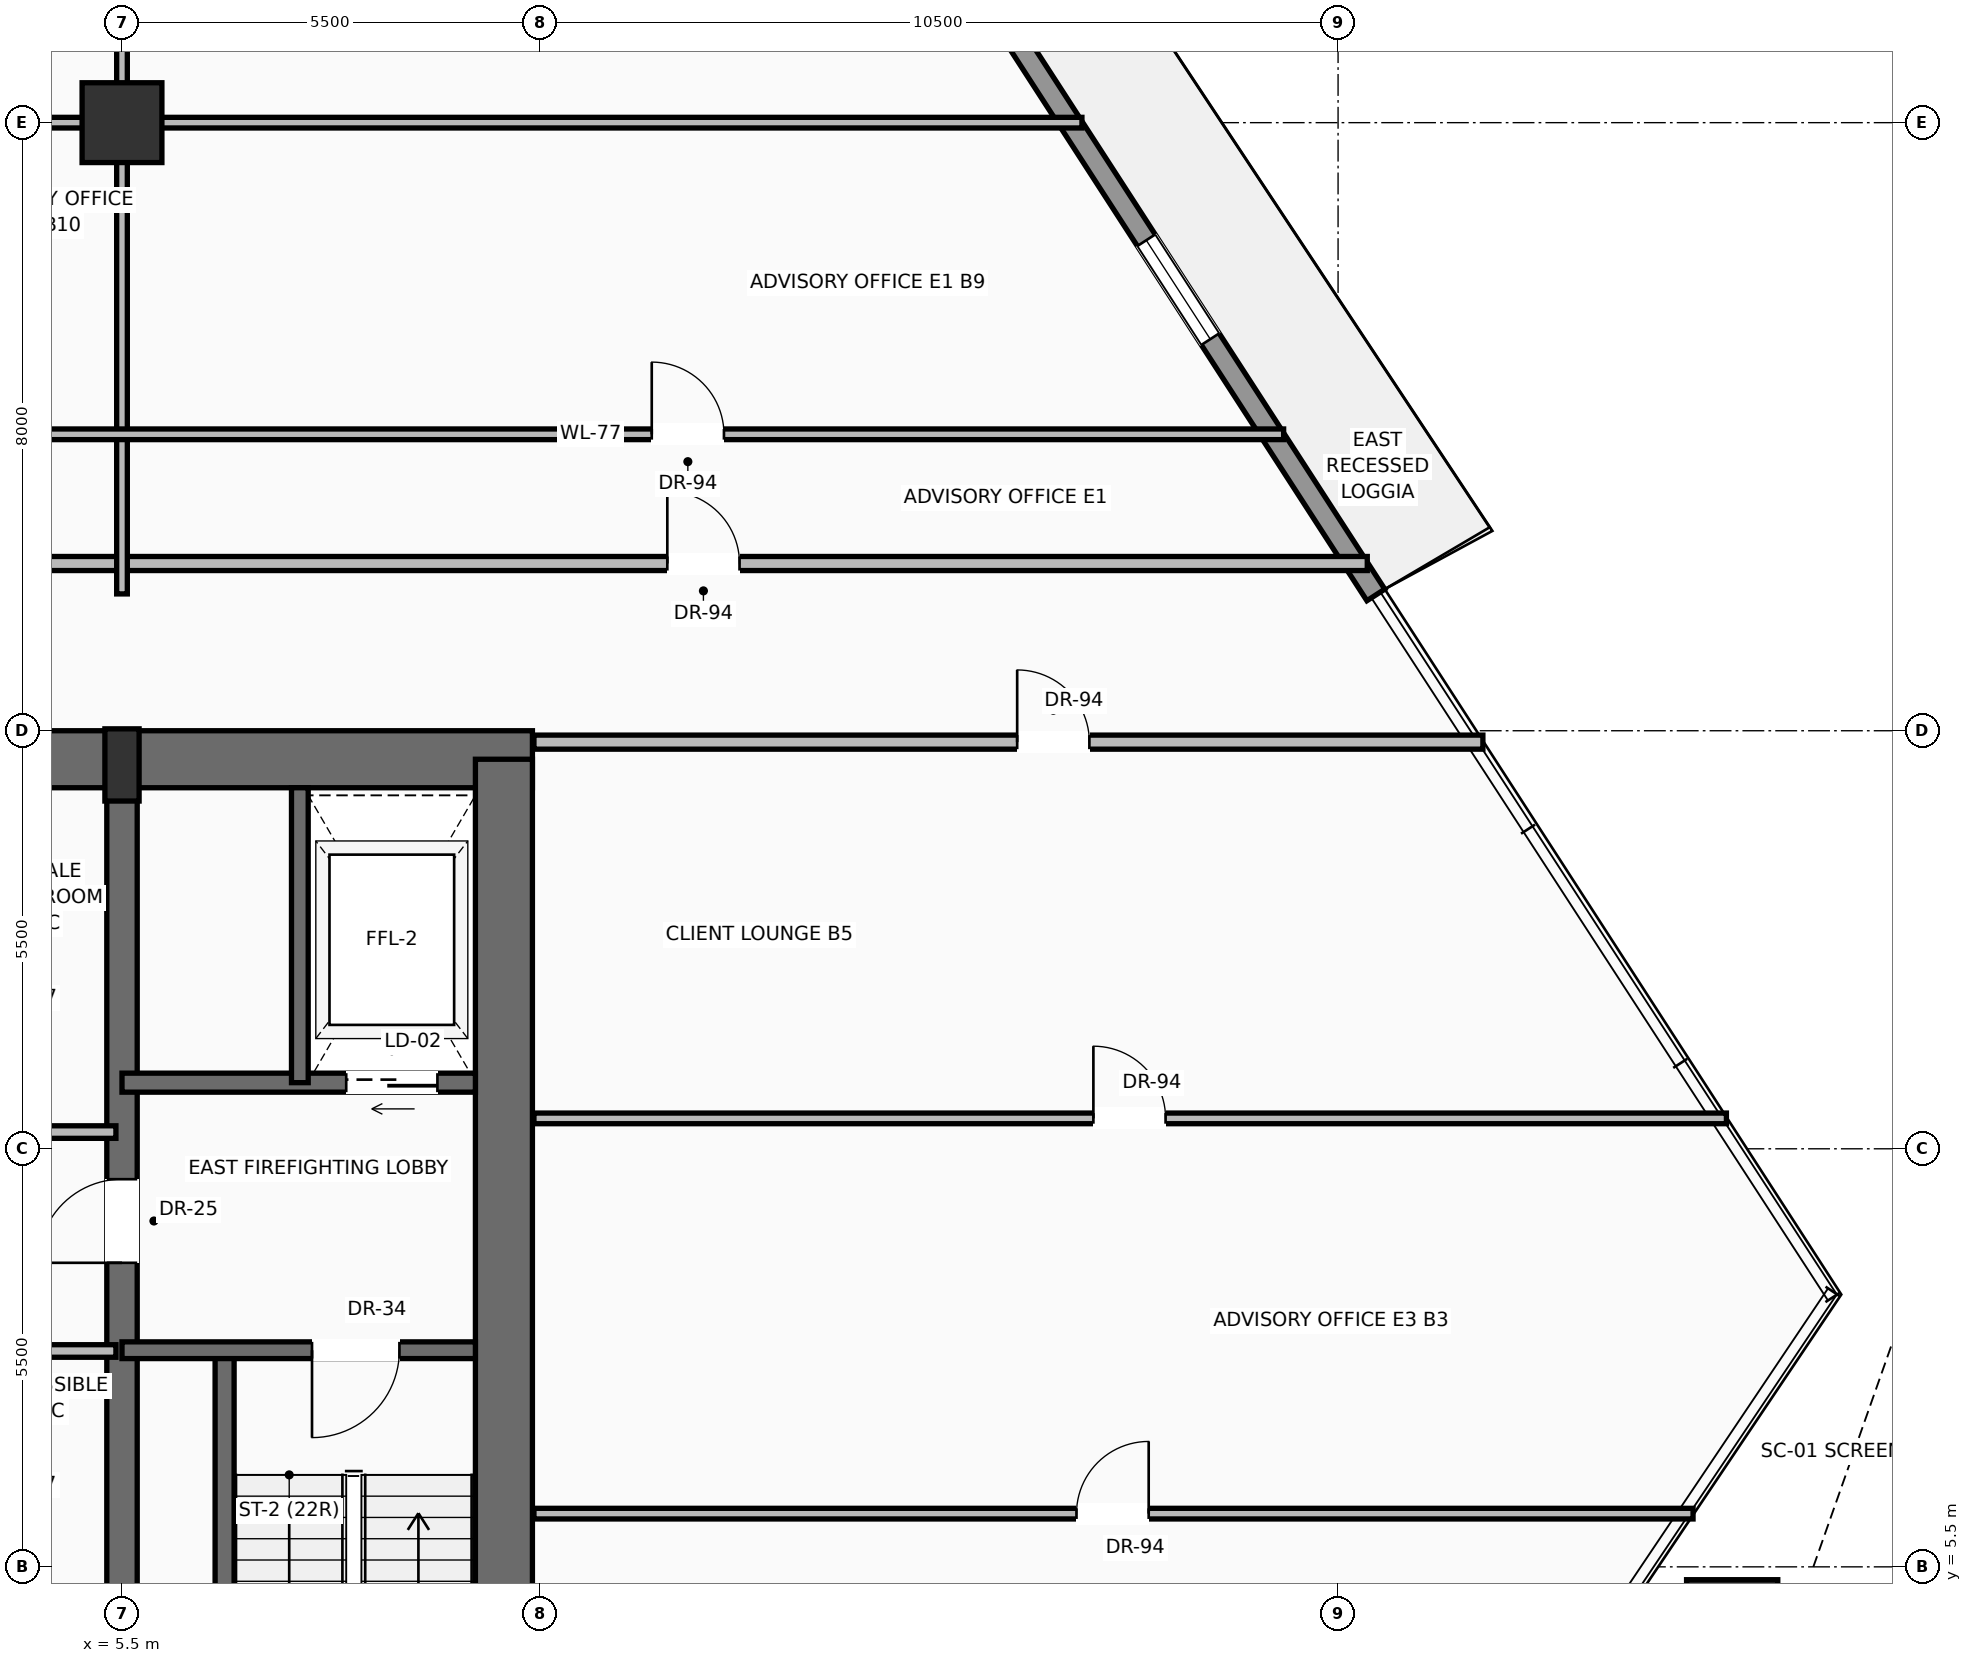
"""IFC4 building model, lengths in metres.
Left out: names, types, materials, properties, quantities, classifications, styles, units other than length and angle.
Written with IfcOpenShell. Run it as: python <this file> out.ifc"""

import sys

from ifc_helpers import new_model, si_unit, direction, frame, frame_2d, origin, origin_2d, place, context, subcontext, project, spatial, rectangle, hollow_rectangle, extrude, source, transform, mapped, element, fill, save


model = new_model("IFC4")
c1 = context("Model", 3, precision=1e-05, world=origin(), true_north=direction((0.0, 1.0)))
c2 = subcontext(c1, "Body", "Model", "MODEL_VIEW")
j1 = project(units=[si_unit("LENGTHUNIT", "METRE"), si_unit("PLANEANGLEUNIT", "RADIAN")], contexts=[c1])
p1 = place(None, origin())
s1 = spatial("IfcSite", under=j1, at=p1, CompositionType="ELEMENT")
p2 = place(p1, origin())
s2 = spatial("IfcBuilding", under=s1, at=p2, CompositionType="ELEMENT")
p3 = place(p2, frame((0.0, 0.0, 95.1)))
s3 = spatial("IfcBuildingStorey", under=s2, at=p3, CompositionType="ELEMENT", Elevation=95.1)
p4 = place(p3, frame((-10.9, 16.125, 0.0), z_axis=(0.0, 0.0, 1.0), x_axis=(1.0, 0.0, 0.0)))
e1 = element("IfcWall", 1, at=p4, inside=s3, PredefinedType="SHEAR", context=c2, shape_type="SweptSolid", body=[
    extrude(rectangle(XDim=21.8, YDim=0.75, at=frame_2d((10.9, 0.0))), origin(), (0.0, 0.0, 1.0), 3.45),
])
p5 = place(p4, frame((3.47, 0.0, 0.0)))
e2 = element("IfcOpeningElement", 2, at=p5, cuts=e1, PredefinedType="OPENING", context=c2, shape_type="SweptSolid", body=[
    extrude(rectangle(XDim=1.3, YDim=2.3, at=frame_2d((0.65, 1.15))), frame((0.0, 0.385, 0.0), z_axis=(0.0, -1.0, 0.0), x_axis=(1.0, 0.0, 0.0)), (0.0, 0.0, 1.0), 0.77),
])
p6 = place(p4, frame((9.9, 0.0, 0.0)))
e3 = element("IfcOpeningElement", 3, at=p6, cuts=e1, PredefinedType="OPENING", context=c2, shape_type="SweptSolid", body=[
    extrude(rectangle(XDim=2.0, YDim=2.4, at=frame_2d((1.0, 1.2))), frame((0.0, 0.385, 0.0), z_axis=(0.0, -1.0, 0.0), x_axis=(1.0, 0.0, 0.0)), (0.0, 0.0, 1.0), 0.77),
])
p7 = place(p3, frame((10.525, 0.475, 0.0), z_axis=(0.0, 0.0, 1.0), x_axis=(0.0, 1.0, 0.0)))
e4 = element("IfcWall", 4, at=p7, inside=s3, PredefinedType="SHEAR", context=c2, shape_type="SweptSolid", body=[
    extrude(rectangle(XDim=15.65, YDim=0.75, at=frame_2d((7.825, 0.0))), origin(), (0.0, 0.0, 1.0), 3.45),
])
p8 = place(p3, frame((5.5, 0.475, 0.0), z_axis=(0.0, 0.0, 1.0), x_axis=(0.0, 1.0, 0.0)))
e5 = element("IfcWall", 5, at=p8, inside=s3, PredefinedType="SHEAR", context=c2, shape_type="SweptSolid", body=[
    extrude(rectangle(XDim=15.65, YDim=0.4, at=frame_2d((7.825, 0.0))), origin(), (0.0, 0.0, 1.0), 3.45),
])
p9 = place(p8, frame((9.025, 0.0, 0.0)))
e6 = element("IfcOpeningElement", 6, at=p9, cuts=e5, PredefinedType="OPENING", context=c2, shape_type="SweptSolid", body=[
    extrude(rectangle(XDim=1.1, YDim=2.2, at=frame_2d((0.55, 1.1))), frame((0.0, 0.21, 0.0), z_axis=(0.0, -1.0, 0.0), x_axis=(1.0, 0.0, 0.0)), (0.0, 0.0, 1.0), 0.42),
])
m1 = source(origin(), c2, "Body", "SweptSolid", [
    extrude(rectangle(XDim=0.45, YDim=0.95, at=origin_2d()), origin(), (0.0, 0.0, 1.0), 3.7),
])
p10 = place(p3, frame((5.5, 16.05, 0.0), z_axis=(0.0, 0.0, 1.0), x_axis=(1.0, 0.0, 0.0)))
e7 = element("IfcColumn", 7, at=p10, inside=s3, PredefinedType="PILASTER", context=c2, shape_type="MappedRepresentation", body=[
    mapped(m1, transform((0.0, 0.0, 0.0), scale=1.0)),
])
m2 = source(origin(), c2, "Body", "SweptSolid", [
    extrude(hollow_rectangle(XDim=1.2, YDim=1.2, WallThickness=0.06, at=origin_2d()), origin(), (0.0, 0.0, 1.0), 3.692),
])
p11 = place(p3, frame((26.685, 4.731, 0.004), z_axis=(-0.000396800785, -0.016004298321, 0.99987184428), x_axis=(0.999692785574, -0.024785771543, 0.0)))
e8 = element("IfcColumn", 8, at=p11, inside=s3, PredefinedType="COLUMN", context=c2, shape_type="MappedRepresentation", body=[
    mapped(m2, transform((0.0, 0.0, 0.0), scale=1.0)),
])
m3 = source(origin(), c2, "Body", "SweptSolid", [
    extrude(rectangle(XDim=1.05, YDim=1.05, at=origin_2d()), origin(), (0.0, 0.0, 1.0), 3.7),
])
p12 = place(p3, frame((5.5, 24.5, 0.0), z_axis=(0.0, 0.0, 1.0), x_axis=(1.0, 0.0, 0.0)))
e9 = element("IfcColumn", 9, at=p12, inside=s3, PredefinedType="COLUMN", context=c2, shape_type="MappedRepresentation", body=[
    mapped(m3, transform((0.0, 0.0, 0.0), scale=1.0)),
])
p13 = place(p3, frame((12.558, 32.869, 0.0), z_axis=(0.0, 0.0, 1.0), x_axis=(0.543391713386, -0.839479270634, 0.0)))
e10 = element("IfcWall", 10, at=p13, inside=s3, PredefinedType="SOLIDWALL", context=c2, shape_type="SweptSolid", body=[
    extrude(rectangle(XDim=17.371, YDim=0.28, at=frame_2d((8.686, 0.0))), origin(), (0.0, 0.0, 1.0), 3.03),
])
p14 = place(p13, frame((4.169, 0.0, 0.0)))
e11 = element("IfcOpeningElement", 11, at=p14, cuts=e10, PredefinedType="OPENING", context=c2, shape_type="SweptSolid", body=[
    extrude(rectangle(XDim=1.6, YDim=2.35, at=frame_2d((0.8, 1.175))), frame((0.0, 0.15, 0.0), z_axis=(0.0, -1.0, 0.0), x_axis=(1.0, 0.0, 0.0)), (0.0, 0.0, 1.0), 0.3),
])
p15 = place(p13, frame((11.812, 0.0, 0.9)))
e12 = element("IfcOpeningElement", 12, at=p15, cuts=e10, PredefinedType="OPENING", context=c2, shape_type="SweptSolid", body=[
    extrude(rectangle(XDim=1.55, YDim=1.85, at=frame_2d((0.775, 0.925))), frame((0.0, 0.15, 0.0), z_axis=(0.0, -1.0, 0.0), x_axis=(1.0, 0.0, 0.0)), (0.0, 0.0, 1.0), 0.3),
])
p16 = place(p3, frame((6.85, 0.85, 0.0), z_axis=(0.0, 0.0, 1.0), x_axis=(0.0, 1.0, 0.0)))
e13 = element("IfcWall", 13, at=p16, inside=s3, PredefinedType="SOLIDWALL", context=c2, shape_type="SweptSolid", body=[
    extrude(rectangle(XDim=7.5, YDim=0.25, at=frame_2d((3.75, 0.0))), origin(), (0.0, 0.0, 1.0), 3.45),
])
p17 = place(p3, frame((10.15, 8.35, 0.0), z_axis=(0.0, 0.0, 1.0), x_axis=(-1.0, 0.0, 0.0)))
e14 = element("IfcWall", 14, at=p17, inside=s3, PredefinedType="SOLIDWALL", context=c2, shape_type="SweptSolid", body=[
    extrude(rectangle(XDim=4.65, YDim=0.22, at=frame_2d((2.325, 0.0))), origin(), (0.0, 0.0, 1.0), 3.45),
])
p18 = place(p17, frame((1.0, 0.0, 0.0)))
e15 = element("IfcOpeningElement", 15, at=p18, cuts=e14, PredefinedType="OPENING", context=c2, shape_type="SweptSolid", body=[
    extrude(rectangle(XDim=1.15, YDim=2.2, at=frame_2d((0.575, 1.1))), frame((0.0, 0.12, 0.0), z_axis=(0.0, -1.0, 0.0), x_axis=(1.0, 0.0, 0.0)), (0.0, 0.0, 1.0), 0.24),
])
p19 = place(p3, frame((10.15, 11.87, 0.0), z_axis=(0.0, 0.0, 1.0), x_axis=(-1.0, 0.0, 0.0)))
e16 = element("IfcWall", 16, at=p19, inside=s3, PredefinedType="SOLIDWALL", context=c2, shape_type="SweptSolid", body=[
    extrude(rectangle(XDim=4.65, YDim=0.25, at=frame_2d((2.325, 0.0))), origin(), (0.0, 0.0, 1.0), 3.45),
])
p20 = place(p19, frame((0.5, 0.0, 0.0)))
e17 = element("IfcOpeningElement", 17, at=p20, cuts=e16, PredefinedType="OPENING", context=c2, shape_type="SweptSolid", body=[
    extrude(rectangle(XDim=1.2, YDim=2.25, at=frame_2d((0.6, 1.125))), frame((0.0, 0.135, 0.0), z_axis=(0.0, -1.0, 0.0), x_axis=(1.0, 0.0, 0.0)), (0.0, 0.0, 1.0), 0.27),
])
p21 = place(p3, frame((7.84, 11.87, 0.0), z_axis=(0.0, 0.0, 1.0), x_axis=(0.0, 1.0, 0.0)))
e18 = element("IfcWall", 18, at=p21, inside=s3, PredefinedType="SOLIDWALL", context=c2, shape_type="SweptSolid", body=[
    extrude(rectangle(XDim=3.88, YDim=0.22, at=frame_2d((1.94, 0.0))), origin(), (0.0, 0.0, 1.0), 3.45),
])
for number, where, z_axis, x_axis in (
    (19, (3.54, 8.34, 0.0), (0.0, 0.0, 1.0), (1.0, 0.0, 0.0)),
    (20, (3.54, 11.22, 0.0), (0.0, 0.0, 1.0), (1.0, 0.0, 0.0)),
):
    element("IfcWall", number, at=place(p3, frame(where, z_axis=z_axis, x_axis=x_axis)), inside=s3, PredefinedType="PARTITIONING", context=c2, shape_type="SweptSolid", body=[
        extrude(rectangle(XDim=1.88, YDim=0.165, at=frame_2d((0.94, 0.0))), origin(), (0.0, 0.0, 1.0), 3.442),
    ])
p22 = place(p3, frame((10.92, 16.35, 0.0), z_axis=(0.0, 0.0, 1.0), x_axis=(1.0, 0.0, 0.0)))
e21 = element("IfcWall", 21, at=p22, inside=s3, PredefinedType="PARTITIONING", context=c2, shape_type="SweptSolid", body=[
    extrude(rectangle(XDim=12.485, YDim=0.185, at=frame_2d((6.243, 0.0))), origin(), (0.0, 0.0, 1.0), 2.747),
])
p23 = place(p22, frame((6.358, 0.0, 0.0)))
e22 = element("IfcOpeningElement", 22, at=p23, cuts=e21, PredefinedType="OPENING", context=c2, shape_type="SweptSolid", body=[
    extrude(rectangle(XDim=0.95, YDim=2.2, at=frame_2d((0.475, 1.1))), frame((0.0, 0.103, 0.0), z_axis=(0.0, -1.0, 0.0), x_axis=(1.0, 0.0, 0.0)), (0.0, 0.0, 1.0), 0.205),
])
p24 = place(p3, frame((2.55, 18.7, 0.0), z_axis=(0.0, 0.0, 1.0), x_axis=(1.0, 0.0, 0.0)))
e23 = element("IfcWall", 23, at=p24, inside=s3, PredefinedType="PARTITIONING", context=c2, shape_type="SweptSolid", body=[
    extrude(rectangle(XDim=19.334, YDim=0.185, at=frame_2d((9.667, 0.0))), origin(), (0.0, 0.0, 1.0), 2.747),
])
p25 = place(p24, frame((10.125, 0.0, 0.0)))
e24 = element("IfcOpeningElement", 24, at=p25, cuts=e23, PredefinedType="OPENING", context=c2, shape_type="SweptSolid", body=[
    extrude(rectangle(XDim=0.95, YDim=2.2, at=frame_2d((0.475, 1.1))), frame((0.0, 0.103, 0.0), z_axis=(0.0, -1.0, 0.0), x_axis=(1.0, 0.0, 0.0)), (0.0, 0.0, 1.0), 0.205),
])
p26 = place(p3, frame((5.5, 18.3, 0.0), z_axis=(0.0, 0.0, 1.0), x_axis=(0.0, 1.0, 0.0)))
e25 = element("IfcWall", 25, at=p26, inside=s3, PredefinedType="PARTITIONING", context=c2, shape_type="SweptSolid", body=[
    extrude(rectangle(XDim=13.2, YDim=0.14, at=frame_2d((6.6, 0.0))), origin(), (0.0, 0.0, 1.0), 2.747),
])
p27 = place(p26, frame((10.671, 0.0, 0.0)))
e26 = element("IfcOpeningElement", 26, at=p27, cuts=e25, PredefinedType="OPENING", context=c2, shape_type="SweptSolid", body=[
    extrude(rectangle(XDim=0.95, YDim=2.2, at=frame_2d((0.475, 1.1))), frame((0.0, 0.08, 0.0), z_axis=(0.0, -1.0, 0.0), x_axis=(1.0, 0.0, 0.0)), (0.0, 0.0, 1.0), 0.16),
])
p28 = place(p26, frame((7.767, 0.0, 0.0)))
e27 = element("IfcOpeningElement", 27, at=p28, cuts=e25, PredefinedType="OPENING", context=c2, shape_type="SweptSolid", body=[
    extrude(rectangle(XDim=0.95, YDim=2.2, at=frame_2d((0.475, 1.1))), frame((0.0, 0.08, 0.0), z_axis=(0.0, -1.0, 0.0), x_axis=(1.0, 0.0, 0.0)), (0.0, 0.0, 1.0), 0.16),
])
p29 = place(p3, frame((2.55, 20.4, 0.0), z_axis=(0.0, 0.0, 1.0), x_axis=(1.0, 0.0, 0.0)))
e28 = element("IfcWall", 28, at=p29, inside=s3, PredefinedType="PARTITIONING", context=c2, shape_type="SweptSolid", body=[
    extrude(rectangle(XDim=18.234, YDim=0.14, at=frame_2d((9.117, 0.0))), origin(), (0.0, 0.0, 1.0), 2.747),
])
p30 = place(p29, frame((9.92, 0.0, 0.0)))
e29 = element("IfcOpeningElement", 29, at=p30, cuts=e28, PredefinedType="OPENING", context=c2, shape_type="SweptSolid", body=[
    extrude(rectangle(XDim=0.95, YDim=2.2, at=frame_2d((0.475, 1.1))), frame((0.0, 0.08, 0.0), z_axis=(0.0, -1.0, 0.0), x_axis=(1.0, 0.0, 0.0)), (0.0, 0.0, 1.0), 0.16),
])
p31 = place(p3, frame((2.55, 24.5, 0.0), z_axis=(0.0, 0.0, 1.0), x_axis=(1.0, 0.0, 0.0)))
e30 = element("IfcWall", 30, at=p31, inside=s3, PredefinedType="PARTITIONING", context=c2, shape_type="SweptSolid", body=[
    extrude(rectangle(XDim=15.58, YDim=0.14, at=frame_2d((7.79, 0.0))), origin(), (0.0, 0.0, 1.0), 2.747),
])
p32 = place(p3, frame((10.92, 6.2, 0.0), z_axis=(0.0, 0.0, 1.0), x_axis=(1.0, 0.0, 0.0)))
e31 = element("IfcWall", 31, at=p32, inside=s3, PredefinedType="PARTITIONING", context=c2, shape_type="SweptSolid", body=[
    extrude(rectangle(XDim=15.25, YDim=0.14, at=frame_2d((7.625, 0.0))), origin(), (0.0, 0.0, 1.0), 2.979),
])
p33 = place(p32, frame((7.138, 0.0, 0.0)))
e32 = element("IfcOpeningElement", 32, at=p33, cuts=e31, PredefinedType="OPENING", context=c2, shape_type="SweptSolid", body=[
    extrude(rectangle(XDim=0.95, YDim=2.2, at=frame_2d((0.475, 1.1))), frame((0.0, 0.08, 0.0), z_axis=(0.0, -1.0, 0.0), x_axis=(1.0, 0.0, 0.0)), (0.0, 0.0, 1.0), 0.16),
])
p34 = place(p3, frame((10.92, 11.4, 0.0), z_axis=(0.0, 0.0, 1.0), x_axis=(1.0, 0.0, 0.0)))
e33 = element("IfcWall", 33, at=p34, inside=s3, PredefinedType="PARTITIONING", context=c2, shape_type="SweptSolid", body=[
    extrude(rectangle(XDim=15.689, YDim=0.14, at=frame_2d((7.845, 0.0))), origin(), (0.0, 0.0, 1.0), 3.442),
])
p35 = place(p34, frame((7.361, 0.0, 0.0)))
e34 = element("IfcOpeningElement", 34, at=p35, cuts=e33, PredefinedType="OPENING", context=c2, shape_type="SweptSolid", body=[
    extrude(rectangle(XDim=0.95, YDim=2.2, at=frame_2d((0.475, 1.1))), frame((0.0, 0.08, 0.0), z_axis=(0.0, -1.0, 0.0), x_axis=(1.0, 0.0, 0.0)), (0.0, 0.0, 1.0), 0.16),
])
m4 = source(origin(), c2, "Body", "SweptSolid", [
    extrude(rectangle(XDim=1.55, YDim=1.85, at=frame_2d((0.775, 0.925))), frame((0.0, 0.03, 0.0), z_axis=(0.0, -1.0, 0.0), x_axis=(1.0, 0.0, 0.0)), (0.0, 0.0, 1.0), 0.06),
])
p36 = place(p15, origin())
e35 = element("IfcWindow", 35, at=p36, inside=s3, PartitioningType="SINGLE_PANEL", PredefinedType="WINDOW", context=c2, shape_type="MappedRepresentation", body=[
    mapped(m4, transform((0.0, 0.0, 0.0), scale=1.0)),
])
fill(e12, e35)
m5 = source(origin(), c2, "Body", "SweptSolid", [
    extrude(rectangle(XDim=1.15, YDim=2.2, at=frame_2d((0.575, 1.1))), frame((0.0, 0.025, 0.0), z_axis=(0.0, -1.0, 0.0), x_axis=(1.0, 0.0, 0.0)), (0.0, 0.0, 1.0), 0.05),
])
p37 = place(p18, origin())
e36 = element("IfcDoor", 36, at=p37, inside=s3, OperationType="SINGLE_SWING_RIGHT", PredefinedType="DOOR", context=c2, shape_type="MappedRepresentation", body=[
    mapped(m5, transform((0.0, 0.0, 0.0), scale=1.0)),
])
fill(e15, e36)
m6 = source(origin(), c2, "Body", "SweptSolid", [
    extrude(rectangle(XDim=1.1, YDim=2.2, at=frame_2d((0.55, 1.1))), frame((0.0, 0.025, 0.0), z_axis=(0.0, -1.0, 0.0), x_axis=(1.0, 0.0, 0.0)), (0.0, 0.0, 1.0), 0.05),
])
p38 = place(p9, origin())
e37 = element("IfcDoor", 37, at=p38, inside=s3, OperationType="SINGLE_SWING_LEFT", PredefinedType="DOOR", context=c2, shape_type="MappedRepresentation", body=[
    mapped(m6, transform((0.0, 0.0, 0.0), scale=1.0)),
])
fill(e6, e37)
m7 = source(origin(), c2, "Body", "SweptSolid", [
    extrude(rectangle(XDim=1.2, YDim=2.25, at=frame_2d((0.6, 1.125))), frame((0.0, 0.025, 0.0), z_axis=(0.0, -1.0, 0.0), x_axis=(1.0, 0.0, 0.0)), (0.0, 0.0, 1.0), 0.05),
])
p39 = place(p20, origin())
e38 = element("IfcDoor", 38, at=p39, inside=s3, OperationType="SLIDING_TO_RIGHT", PredefinedType="DOOR", context=c2, shape_type="MappedRepresentation", body=[
    mapped(m7, transform((0.0, 0.0, 0.0), scale=1.0)),
])
fill(e17, e38)
m8 = source(origin(), c2, "Body", "SweptSolid", [
    extrude(rectangle(XDim=0.95, YDim=2.2, at=frame_2d((0.475, 1.1))), frame((0.0, 0.025, 0.0), z_axis=(0.0, -1.0, 0.0), x_axis=(1.0, 0.0, 0.0)), (0.0, 0.0, 1.0), 0.05),
])
p40 = place(p23, origin())
e39 = element("IfcDoor", 39, at=p40, inside=s3, OperationType="SINGLE_SWING_LEFT", PredefinedType="DOOR", context=c2, shape_type="MappedRepresentation", body=[
    mapped(m8, transform((0.0, 0.0, 0.0), scale=1.0)),
])
fill(e22, e39)
p41 = place(p25, origin())
e40 = element("IfcDoor", 40, at=p41, inside=s3, OperationType="SINGLE_SWING_LEFT", PredefinedType="DOOR", context=c2, shape_type="MappedRepresentation", body=[
    mapped(m8, transform((0.0, 0.0, 0.0), scale=1.0)),
])
fill(e24, e40)
p42 = place(p35, origin())
e41 = element("IfcDoor", 41, at=p42, inside=s3, OperationType="SINGLE_SWING_LEFT", PredefinedType="DOOR", context=c2, shape_type="MappedRepresentation", body=[
    mapped(m8, transform((0.0, 0.0, 0.0), scale=1.0)),
])
fill(e34, e41)
p43 = place(p30, origin())
e42 = element("IfcDoor", 42, at=p43, inside=s3, OperationType="SINGLE_SWING_LEFT", PredefinedType="DOOR", context=c2, shape_type="MappedRepresentation", body=[
    mapped(m8, transform((0.0, 0.0, 0.0), scale=1.0)),
])
fill(e29, e42)
p44 = place(p33, origin())
e43 = element("IfcDoor", 43, at=p44, inside=s3, OperationType="SINGLE_SWING_RIGHT", PredefinedType="DOOR", context=c2, shape_type="MappedRepresentation", body=[
    mapped(m8, transform((0.0, 0.0, 0.0), scale=1.0)),
])
fill(e32, e43)
save(model, sys.argv[1])
